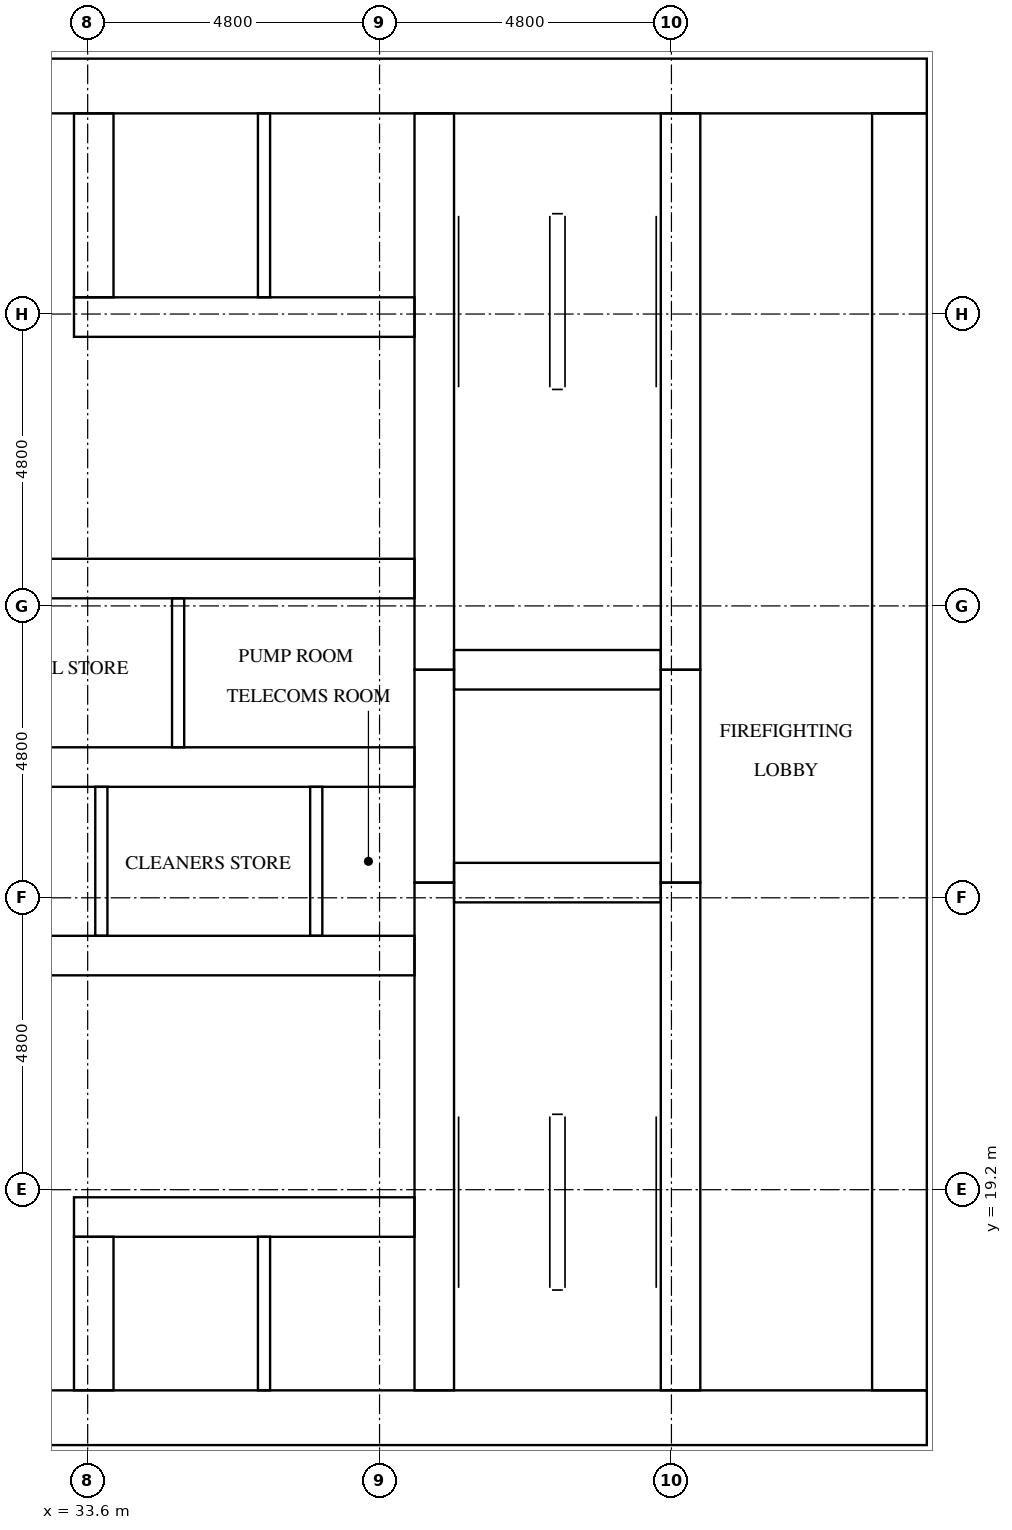
"""IFC4 building model, lengths in metres.
Left out: names, types, materials, properties, quantities, classifications, styles, units other than length and angle.
Written with IfcOpenShell. Run it as: python <this file> out.ifc"""

import sys

from ifc_helpers import new_model, si_unit, direction, frame, frame_2d, origin, place, context, subcontext, project, spatial, rectangle, extrude, element, fill, save


model = new_model("IFC4")
c1 = context("Model", 3, precision=1e-05, world=origin(), true_north=direction((0.0, 1.0)))
c2 = subcontext(c1, "Body", "Model", "MODEL_VIEW")
j1 = project(units=[si_unit("LENGTHUNIT", "METRE"), si_unit("PLANEANGLEUNIT", "RADIAN")], contexts=[c1])
p1 = place(None, origin())
s1 = spatial("IfcSite", under=j1, at=p1, CompositionType="ELEMENT")
p2 = place(p1, origin())
s2 = spatial("IfcBuilding", under=s1, at=p2, CompositionType="ELEMENT")
p3 = place(p2, frame((0.0, 0.0, 92.7)))
s3 = spatial("IfcBuildingStorey", under=s2, at=p3, CompositionType="ELEMENT", Elevation=92.7)
p4 = place(p3, frame((15.0, 15.45, 0.0), z_axis=(0.0, 0.0, 1.0), x_axis=(1.0, 0.0, 0.0)))
e1 = element("IfcWall", 1, at=p4, inside=s3, PredefinedType="SHEAR", context=c2, shape_type="SweptSolid", body=[
    extrude(rectangle(XDim=32.4, YDim=0.9, at=frame_2d((16.2, 0.0))), origin(), (0.0, 0.0, 1.0), 3.2),
])
p5 = place(p4, frame((15.3, 0.0, 0.0)))
e2 = element("IfcOpeningElement", 2, at=p5, cuts=e1, PredefinedType="OPENING", context=c2, shape_type="SweptSolid", body=[
    extrude(rectangle(XDim=1.8, YDim=2.1, at=frame_2d((0.9, 1.05))), frame((0.0, 0.46, 0.0), z_axis=(0.0, -1.0, 0.0), x_axis=(1.0, 0.0, 0.0)), (0.0, 0.0, 1.0), 0.92),
])
p6 = place(p3, frame((15.0, 37.35, 0.0), z_axis=(0.0, 0.0, 1.0), x_axis=(1.0, 0.0, 0.0)))
e3 = element("IfcWall", 3, at=p6, inside=s3, PredefinedType="SHEAR", context=c2, shape_type="SweptSolid", body=[
    extrude(rectangle(XDim=32.4, YDim=0.9, at=frame_2d((16.2, 0.0))), origin(), (0.0, 0.0, 1.0), 3.2),
])
p7 = place(p6, frame((15.3, 0.0, 0.0)))
e4 = element("IfcOpeningElement", 4, at=p7, cuts=e3, PredefinedType="OPENING", context=c2, shape_type="SweptSolid", body=[
    extrude(rectangle(XDim=1.8, YDim=2.1, at=frame_2d((0.9, 1.05))), frame((0.0, 0.46, 0.0), z_axis=(0.0, -1.0, 0.0), x_axis=(1.0, 0.0, 0.0)), (0.0, 0.0, 1.0), 0.92),
])
p8 = place(p6, frame((1.794, 0.0, 0.0)))
e5 = element("IfcOpeningElement", 5, at=p8, cuts=e3, PredefinedType="OPENING", context=c2, shape_type="SweptSolid", body=[
    extrude(rectangle(XDim=1.0, YDim=2.1, at=frame_2d((0.5, 1.05))), frame((0.0, 0.46, 0.0), z_axis=(0.0, -1.0, 0.0), x_axis=(1.0, 0.0, 0.0)), (0.0, 0.0, 1.0), 0.92),
])
p9 = place(p6, frame((5.331, 0.0, 0.0)))
e6 = element("IfcOpeningElement", 6, at=p9, cuts=e3, PredefinedType="OPENING", context=c2, shape_type="SweptSolid", body=[
    extrude(rectangle(XDim=1.0, YDim=2.1, at=frame_2d((0.5, 1.05))), frame((0.0, 0.46, 0.0), z_axis=(0.0, -1.0, 0.0), x_axis=(1.0, 0.0, 0.0)), (0.0, 0.0, 1.0), 0.92),
])
p10 = place(p3, frame((46.95, 15.9, 0.0), z_axis=(0.0, 0.0, 1.0), x_axis=(0.0, 1.0, 0.0)))
e7 = element("IfcWall", 7, at=p10, inside=s3, PredefinedType="SHEAR", context=c2, shape_type="SweptSolid", body=[
    extrude(rectangle(XDim=21.0, YDim=0.9, at=frame_2d((10.5, 0.0))), origin(), (0.0, 0.0, 1.0), 3.2),
])
p11 = place(p10, frame((10.2, 0.0, 0.0)))
e8 = element("IfcOpeningElement", 8, at=p11, cuts=e7, PredefinedType="OPENING", context=c2, shape_type="SweptSolid", body=[
    extrude(rectangle(XDim=1.2, YDim=2.1, at=frame_2d((0.6, 1.05))), frame((0.0, 0.46, 0.0), z_axis=(0.0, -1.0, 0.0), x_axis=(1.0, 0.0, 0.0)), (0.0, 0.0, 1.0), 0.92),
])
p12 = place(p3, frame((39.3, 15.9, 0.0), z_axis=(0.0, 0.0, 1.0), x_axis=(0.0, 1.0, 0.0)))
e9 = element("IfcWall", 9, at=p12, inside=s3, PredefinedType="SHEAR", context=c2, shape_type="SweptSolid", body=[
    extrude(rectangle(XDim=8.35, YDim=0.65, at=frame_2d((4.175, 0.0))), origin(), (0.0, 0.0, 1.0), 3.2),
])
p13 = place(p3, frame((39.3, 24.25, 0.0), z_axis=(0.0, 0.0, 1.0), x_axis=(0.0, 1.0, 0.0)))
e10 = element("IfcWall", 10, at=p13, inside=s3, PredefinedType="SHEAR", context=c2, shape_type="SweptSolid", body=[
    extrude(rectangle(XDim=3.5, YDim=0.65, at=frame_2d((1.75, 0.0))), origin(), (0.0, 0.0, 1.0), 3.2),
])
p14 = place(p3, frame((39.3, 27.75, 0.0), z_axis=(0.0, 0.0, 1.0), x_axis=(0.0, 1.0, 0.0)))
e11 = element("IfcWall", 11, at=p14, inside=s3, PredefinedType="SHEAR", context=c2, shape_type="SweptSolid", body=[
    extrude(rectangle(XDim=9.15, YDim=0.65, at=frame_2d((4.575, 0.0))), origin(), (0.0, 0.0, 1.0), 3.2),
])
p15 = place(p3, frame((43.35, 15.9, 0.0), z_axis=(0.0, 0.0, 1.0), x_axis=(0.0, 1.0, 0.0)))
e12 = element("IfcWall", 12, at=p15, inside=s3, PredefinedType="SHEAR", context=c2, shape_type="SweptSolid", body=[
    extrude(rectangle(XDim=8.35, YDim=0.65, at=frame_2d((4.175, 0.0))), origin(), (0.0, 0.0, 1.0), 3.2),
])
p16 = place(p15, frame((0.3, 0.0, 0.0)))
e13 = element("IfcOpeningElement", 13, at=p16, cuts=e12, PredefinedType="OPENING", context=c2, shape_type="SweptSolid", body=[
    extrude(rectangle(XDim=1.2, YDim=2.1, at=frame_2d((0.6, 1.05))), frame((0.0, 0.335, 0.0), z_axis=(0.0, -1.0, 0.0), x_axis=(1.0, 0.0, 0.0)), (0.0, 0.0, 1.0), 0.67),
])
p17 = place(p3, frame((43.35, 24.25, 0.0), z_axis=(0.0, 0.0, 1.0), x_axis=(0.0, 1.0, 0.0)))
e14 = element("IfcWall", 14, at=p17, inside=s3, PredefinedType="SHEAR", context=c2, shape_type="SweptSolid", body=[
    extrude(rectangle(XDim=3.5, YDim=0.65, at=frame_2d((1.75, 0.0))), origin(), (0.0, 0.0, 1.0), 3.2),
])
p18 = place(p17, frame((1.2, 0.0, 0.0)))
e15 = element("IfcOpeningElement", 15, at=p18, cuts=e14, PredefinedType="OPENING", context=c2, shape_type="SweptSolid", body=[
    extrude(rectangle(XDim=1.1, YDim=2.1, at=frame_2d((0.55, 1.05))), frame((0.0, 0.335, 0.0), z_axis=(0.0, -1.0, 0.0), x_axis=(1.0, 0.0, 0.0)), (0.0, 0.0, 1.0), 0.67),
])
p19 = place(p3, frame((43.35, 27.75, 0.0), z_axis=(0.0, 0.0, 1.0), x_axis=(0.0, 1.0, 0.0)))
e16 = element("IfcWall", 16, at=p19, inside=s3, PredefinedType="SHEAR", context=c2, shape_type="SweptSolid", body=[
    extrude(rectangle(XDim=9.15, YDim=0.65, at=frame_2d((4.575, 0.0))), origin(), (0.0, 0.0, 1.0), 3.2),
])
p20 = place(p19, frame((7.65, 0.0, 0.0)))
e17 = element("IfcOpeningElement", 17, at=p20, cuts=e16, PredefinedType="OPENING", context=c2, shape_type="SweptSolid", body=[
    extrude(rectangle(XDim=1.2, YDim=2.1, at=frame_2d((0.6, 1.05))), frame((0.0, 0.335, 0.0), z_axis=(0.0, -1.0, 0.0), x_axis=(1.0, 0.0, 0.0)), (0.0, 0.0, 1.0), 0.67),
])
for number, where, z_axis, x_axis in (
    (18, (39.625, 24.25, 0.0), (0.0, 0.0, 1.0), (1.0, 0.0, 0.0)),
    (19, (39.625, 27.75, 0.0), (0.0, 0.0, 1.0), (1.0, 0.0, 0.0)),
):
    element("IfcWall", number, at=place(p3, frame(where, z_axis=z_axis, x_axis=x_axis)), inside=s3, PredefinedType="SHEAR", context=c2, shape_type="SweptSolid", body=[
        extrude(rectangle(XDim=3.4, YDim=0.65, at=frame_2d((1.7, 0.0))), origin(), (0.0, 0.0, 1.0), 3.2),
    ])
p21 = place(p3, frame((33.375, 18.75, 0.0), z_axis=(0.0, 0.0, 1.0), x_axis=(1.0, 0.0, 0.0)))
e20 = element("IfcWall", 20, at=p21, inside=s3, PredefinedType="SHEAR", context=c2, shape_type="SweptSolid", body=[
    extrude(rectangle(XDim=5.6, YDim=0.65, at=frame_2d((2.8, 0.0))), origin(), (0.0, 0.0, 1.0), 3.2),
])
p22 = place(p21, frame((1.288, 0.0, 0.0)))
e21 = element("IfcOpeningElement", 21, at=p22, cuts=e20, PredefinedType="OPENING", context=c2, shape_type="SweptSolid", body=[
    extrude(rectangle(XDim=1.1, YDim=2.1, at=frame_2d((0.55, 1.05))), frame((0.0, 0.335, 0.0), z_axis=(0.0, -1.0, 0.0), x_axis=(1.0, 0.0, 0.0)), (0.0, 0.0, 1.0), 0.67),
])
p23 = place(p21, frame((3.863, 0.0, 0.0)))
e22 = element("IfcOpeningElement", 22, at=p23, cuts=e20, PredefinedType="OPENING", context=c2, shape_type="SweptSolid", body=[
    extrude(rectangle(XDim=1.1, YDim=2.1, at=frame_2d((0.55, 1.05))), frame((0.0, 0.335, 0.0), z_axis=(0.0, -1.0, 0.0), x_axis=(1.0, 0.0, 0.0)), (0.0, 0.0, 1.0), 0.67),
])
p24 = place(p3, frame((23.425, 23.05, 0.0), z_axis=(0.0, 0.0, 1.0), x_axis=(1.0, 0.0, 0.0)))
e23 = element("IfcWall", 23, at=p24, inside=s3, PredefinedType="SHEAR", context=c2, shape_type="SweptSolid", body=[
    extrude(rectangle(XDim=15.55, YDim=0.65, at=frame_2d((7.775, 0.0))), origin(), (0.0, 0.0, 1.0), 3.2),
])
p25 = place(p24, frame((2.025, 0.0, 0.0)))
e24 = element("IfcOpeningElement", 24, at=p25, cuts=e23, PredefinedType="OPENING", context=c2, shape_type="SweptSolid", body=[
    extrude(rectangle(XDim=1.0, YDim=2.1, at=frame_2d((0.5, 1.05))), frame((0.0, 0.335, 0.0), z_axis=(0.0, -1.0, 0.0), x_axis=(1.0, 0.0, 0.0)), (0.0, 0.0, 1.0), 0.67),
])
p26 = place(p24, frame((11.667, 0.0, 0.0)))
e25 = element("IfcOpeningElement", 25, at=p26, cuts=e23, PredefinedType="OPENING", context=c2, shape_type="SweptSolid", body=[
    extrude(rectangle(XDim=1.0, YDim=2.1, at=frame_2d((0.5, 1.05))), frame((0.0, 0.335, 0.0), z_axis=(0.0, -1.0, 0.0), x_axis=(1.0, 0.0, 0.0)), (0.0, 0.0, 1.0), 0.67),
])
p27 = place(p24, frame((14.292, 0.0, 0.0)))
e26 = element("IfcOpeningElement", 26, at=p27, cuts=e23, PredefinedType="OPENING", context=c2, shape_type="SweptSolid", body=[
    extrude(rectangle(XDim=1.0, YDim=2.1, at=frame_2d((0.5, 1.05))), frame((0.0, 0.335, 0.0), z_axis=(0.0, -1.0, 0.0), x_axis=(1.0, 0.0, 0.0)), (0.0, 0.0, 1.0), 0.67),
])
p28 = place(p3, frame((23.425, 26.15, 0.0), z_axis=(0.0, 0.0, 1.0), x_axis=(1.0, 0.0, 0.0)))
e27 = element("IfcWall", 27, at=p28, inside=s3, PredefinedType="SHEAR", context=c2, shape_type="SweptSolid", body=[
    extrude(rectangle(XDim=15.55, YDim=0.65, at=frame_2d((7.775, 0.0))), origin(), (0.0, 0.0, 1.0), 3.2),
])
p29 = place(p3, frame((23.425, 29.25, 0.0), z_axis=(0.0, 0.0, 1.0), x_axis=(1.0, 0.0, 0.0)))
e28 = element("IfcWall", 28, at=p29, inside=s3, PredefinedType="SHEAR", context=c2, shape_type="SweptSolid", body=[
    extrude(rectangle(XDim=15.55, YDim=0.65, at=frame_2d((7.775, 0.0))), origin(), (0.0, 0.0, 1.0), 3.2),
])
p30 = place(p29, frame((1.394, 0.0, 0.0)))
e29 = element("IfcOpeningElement", 29, at=p30, cuts=e28, PredefinedType="OPENING", context=c2, shape_type="SweptSolid", body=[
    extrude(rectangle(XDim=1.0, YDim=2.1, at=frame_2d((0.5, 1.05))), frame((0.0, 0.335, 0.0), z_axis=(0.0, -1.0, 0.0), x_axis=(1.0, 0.0, 0.0)), (0.0, 0.0, 1.0), 0.67),
])
p31 = place(p29, frame((5.331, 0.0, 0.0)))
e30 = element("IfcOpeningElement", 30, at=p31, cuts=e28, PredefinedType="OPENING", context=c2, shape_type="SweptSolid", body=[
    extrude(rectangle(XDim=1.0, YDim=2.1, at=frame_2d((0.5, 1.05))), frame((0.0, 0.335, 0.0), z_axis=(0.0, -1.0, 0.0), x_axis=(1.0, 0.0, 0.0)), (0.0, 0.0, 1.0), 0.67),
])
p32 = place(p29, frame((9.219, 0.0, 0.0)))
e31 = element("IfcOpeningElement", 31, at=p32, cuts=e28, PredefinedType="OPENING", context=c2, shape_type="SweptSolid", body=[
    extrude(rectangle(XDim=1.0, YDim=2.1, at=frame_2d((0.5, 1.05))), frame((0.0, 0.335, 0.0), z_axis=(0.0, -1.0, 0.0), x_axis=(1.0, 0.0, 0.0)), (0.0, 0.0, 1.0), 0.67),
])
p33 = place(p29, frame((13.156, 0.0, 0.0)))
e32 = element("IfcOpeningElement", 32, at=p33, cuts=e28, PredefinedType="OPENING", context=c2, shape_type="SweptSolid", body=[
    extrude(rectangle(XDim=1.0, YDim=2.1, at=frame_2d((0.5, 1.05))), frame((0.0, 0.335, 0.0), z_axis=(0.0, -1.0, 0.0), x_axis=(1.0, 0.0, 0.0)), (0.0, 0.0, 1.0), 0.67),
])
p34 = place(p3, frame((33.375, 33.55, 0.0), z_axis=(0.0, 0.0, 1.0), x_axis=(1.0, 0.0, 0.0)))
e33 = element("IfcWall", 33, at=p34, inside=s3, PredefinedType="SHEAR", context=c2, shape_type="SweptSolid", body=[
    extrude(rectangle(XDim=5.6, YDim=0.65, at=frame_2d((2.8, 0.0))), origin(), (0.0, 0.0, 1.0), 3.2),
])
p35 = place(p3, frame((33.7, 15.9, 0.0), z_axis=(0.0, 0.0, 1.0), x_axis=(0.0, 1.0, 0.0)))
e34 = element("IfcWall", 34, at=p35, inside=s3, PredefinedType="SHEAR", context=c2, shape_type="SweptSolid", body=[
    extrude(rectangle(XDim=2.525, YDim=0.65, at=frame_2d((1.263, 0.0))), origin(), (0.0, 0.0, 1.0), 3.2),
])
p36 = place(p3, frame((33.7, 33.875, 0.0), z_axis=(0.0, 0.0, 1.0), x_axis=(0.0, 1.0, 0.0)))
e35 = element("IfcWall", 35, at=p36, inside=s3, PredefinedType="SHEAR", context=c2, shape_type="SweptSolid", body=[
    extrude(rectangle(XDim=3.025, YDim=0.65, at=frame_2d((1.512, 0.0))), origin(), (0.0, 0.0, 1.0), 3.2),
])
p37 = place(p3, frame((33.825, 23.375, 0.0), z_axis=(0.0, 0.0, 1.0), x_axis=(0.0, 1.0, 0.0)))
e36 = element("IfcWall", 36, at=p37, inside=s3, PredefinedType="SOLIDWALL", context=c2, shape_type="SweptSolid", body=[
    extrude(rectangle(XDim=2.45, YDim=0.2, at=frame_2d((1.225, 0.0))), origin(), (0.0, 0.0, 1.0), 3.2),
])
p38 = place(p3, frame((36.5, 15.9, 0.0), z_axis=(0.0, 0.0, 1.0), x_axis=(0.0, 1.0, 0.0)))
e37 = element("IfcWall", 37, at=p38, inside=s3, PredefinedType="SOLIDWALL", context=c2, shape_type="SweptSolid", body=[
    extrude(rectangle(XDim=2.525, YDim=0.2, at=frame_2d((1.263, 0.0))), origin(), (0.0, 0.0, 1.0), 3.2),
])
p39 = place(p3, frame((36.5, 33.875, 0.0), z_axis=(0.0, 0.0, 1.0), x_axis=(0.0, 1.0, 0.0)))
e38 = element("IfcWall", 38, at=p39, inside=s3, PredefinedType="SOLIDWALL", context=c2, shape_type="SweptSolid", body=[
    extrude(rectangle(XDim=3.025, YDim=0.2, at=frame_2d((1.512, 0.0))), origin(), (0.0, 0.0, 1.0), 3.2),
])
for number, where, z_axis, x_axis in (
    (39, (37.359, 23.375, 0.0), (0.0, 0.0, 1.0), (0.0, 1.0, 0.0)),
    (40, (35.087, 26.475, 0.0), (0.0, 0.0, 1.0), (0.0, 1.0, 0.0)),
):
    element("IfcWall", number, at=place(p3, frame(where, z_axis=z_axis, x_axis=x_axis)), inside=s3, PredefinedType="PARTITIONING", context=c2, shape_type="SweptSolid", body=[
        extrude(rectangle(XDim=2.45, YDim=0.2, at=frame_2d((1.225, 0.0))), origin(), (0.0, 0.0, 1.0), 3.2),
    ])
p40 = place(p22, origin())
e41 = element("IfcDoor", 41, at=p40, inside=s3, OperationType="DOUBLE_DOOR_SLIDING", PredefinedType="DOOR", context=c2, shape_type="SweptSolid", body=[
    extrude(rectangle(XDim=1.1, YDim=2.1, at=frame_2d((0.55, 1.05))), frame((0.0, 0.025, 0.0), z_axis=(0.0, -1.0, 0.0), x_axis=(1.0, 0.0, 0.0)), (0.0, 0.0, 1.0), 0.05),
])
fill(e21, e41)
p41 = place(p23, origin())
e42 = element("IfcDoor", 42, at=p41, inside=s3, OperationType="DOUBLE_DOOR_SLIDING", PredefinedType="DOOR", context=c2, shape_type="SweptSolid", body=[
    extrude(rectangle(XDim=1.1, YDim=2.1, at=frame_2d((0.55, 1.05))), frame((0.0, 0.025, 0.0), z_axis=(0.0, -1.0, 0.0), x_axis=(1.0, 0.0, 0.0)), (0.0, 0.0, 1.0), 0.05),
])
fill(e22, e42)
p42 = place(p18, origin())
e43 = element("IfcDoor", 43, at=p42, inside=s3, OperationType="DOUBLE_DOOR_SLIDING", PredefinedType="DOOR", context=c2, shape_type="SweptSolid", body=[
    extrude(rectangle(XDim=1.1, YDim=2.1, at=frame_2d((0.55, 1.05))), frame((0.0, 0.025, 0.0), z_axis=(0.0, -1.0, 0.0), x_axis=(1.0, 0.0, 0.0)), (0.0, 0.0, 1.0), 0.05),
])
fill(e15, e43)
p43 = place(p16, origin())
e44 = element("IfcDoor", 44, at=p43, inside=s3, OperationType="SINGLE_SWING_RIGHT", PredefinedType="DOOR", context=c2, shape_type="SweptSolid", body=[
    extrude(rectangle(XDim=1.2, YDim=2.1, at=frame_2d((0.6, 1.05))), frame((0.0, 0.025, 0.0), z_axis=(0.0, -1.0, 0.0), x_axis=(1.0, 0.0, 0.0)), (0.0, 0.0, 1.0), 0.05),
])
fill(e13, e44)
p44 = place(p20, origin())
e45 = element("IfcDoor", 45, at=p44, inside=s3, OperationType="SINGLE_SWING_LEFT", PredefinedType="DOOR", context=c2, shape_type="SweptSolid", body=[
    extrude(rectangle(XDim=1.2, YDim=2.1, at=frame_2d((0.6, 1.05))), frame((0.0, 0.025, 0.0), z_axis=(0.0, -1.0, 0.0), x_axis=(1.0, 0.0, 0.0)), (0.0, 0.0, 1.0), 0.05),
])
fill(e17, e45)
p45 = place(p11, origin())
e46 = element("IfcDoor", 46, at=p45, inside=s3, OperationType="SINGLE_SWING_LEFT", PredefinedType="DOOR", context=c2, shape_type="SweptSolid", body=[
    extrude(rectangle(XDim=1.2, YDim=2.1, at=frame_2d((0.6, 1.05))), frame((0.0, 0.025, 0.0), z_axis=(0.0, -1.0, 0.0), x_axis=(1.0, 0.0, 0.0)), (0.0, 0.0, 1.0), 0.05),
])
fill(e8, e46)
p46 = place(p26, frame((1.0, 0.0, 0.0), z_axis=(0.0, 0.0, 1.0), x_axis=(-1.0, 0.0, 0.0)))
e47 = element("IfcDoor", 47, at=p46, inside=s3, OperationType="SINGLE_SWING_LEFT", PredefinedType="DOOR", context=c2, shape_type="SweptSolid", body=[
    extrude(rectangle(XDim=1.0, YDim=2.1, at=frame_2d((0.5, 1.05))), frame((0.0, 0.025, 0.0), z_axis=(0.0, -1.0, 0.0), x_axis=(1.0, 0.0, 0.0)), (0.0, 0.0, 1.0), 0.05),
])
fill(e25, e47)
p47 = place(p27, frame((1.0, 0.0, 0.0), z_axis=(0.0, 0.0, 1.0), x_axis=(-1.0, 0.0, 0.0)))
e48 = element("IfcDoor", 48, at=p47, inside=s3, OperationType="SINGLE_SWING_RIGHT", PredefinedType="DOOR", context=c2, shape_type="SweptSolid", body=[
    extrude(rectangle(XDim=1.0, YDim=2.1, at=frame_2d((0.5, 1.05))), frame((0.0, 0.025, 0.0), z_axis=(0.0, -1.0, 0.0), x_axis=(1.0, 0.0, 0.0)), (0.0, 0.0, 1.0), 0.05),
])
fill(e26, e48)
p48 = place(p32, origin())
e49 = element("IfcDoor", 49, at=p48, inside=s3, OperationType="SINGLE_SWING_LEFT", PredefinedType="DOOR", context=c2, shape_type="SweptSolid", body=[
    extrude(rectangle(XDim=1.0, YDim=2.1, at=frame_2d((0.5, 1.05))), frame((0.0, 0.025, 0.0), z_axis=(0.0, -1.0, 0.0), x_axis=(1.0, 0.0, 0.0)), (0.0, 0.0, 1.0), 0.05),
])
fill(e31, e49)
p49 = place(p33, origin())
e50 = element("IfcDoor", 50, at=p49, inside=s3, OperationType="SINGLE_SWING_RIGHT", PredefinedType="DOOR", context=c2, shape_type="SweptSolid", body=[
    extrude(rectangle(XDim=1.0, YDim=2.1, at=frame_2d((0.5, 1.05))), frame((0.0, 0.025, 0.0), z_axis=(0.0, -1.0, 0.0), x_axis=(1.0, 0.0, 0.0)), (0.0, 0.0, 1.0), 0.05),
])
fill(e32, e50)
save(model, sys.argv[1])
